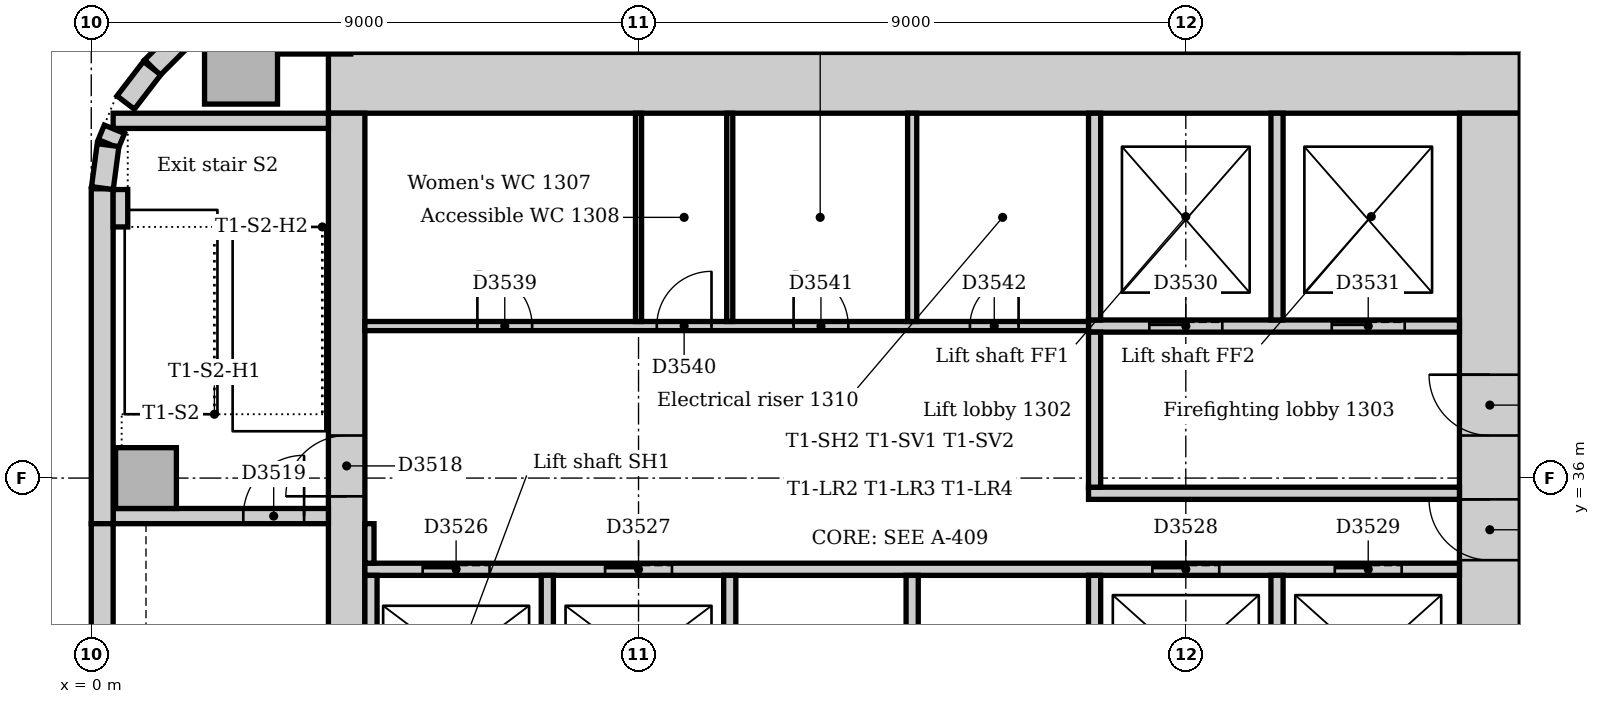
"""IFC4 building model, lengths in metres.
Left out: names, types, materials, properties, quantities, classifications, styles, units other than length and angle.
Written with IfcOpenShell. Run it as: python <this file> out.ifc"""

import sys

from ifc_helpers import new_model, si_unit, direction, frame, frame_2d, origin, origin_2d, place, context, subcontext, project, spatial, rectangle, extrude, element, fill, save


model = new_model("IFC4")
c1 = context("Model", 3, precision=1e-05, world=origin(), true_north=direction((0.0, 1.0)))
c2 = subcontext(c1, "Body", "Model", "MODEL_VIEW")
j1 = project(units=[si_unit("LENGTHUNIT", "METRE"), si_unit("PLANEANGLEUNIT", "RADIAN")], contexts=[c1])
p1 = place(None, origin())
s1 = spatial("IfcSite", under=j1, at=p1, CompositionType="ELEMENT")
p2 = place(p1, origin())
s2 = spatial("IfcBuilding", under=s1, at=p2, CompositionType="ELEMENT")
p3 = place(p2, frame((0.0, 0.0, 59.0)))
s3 = spatial("IfcBuildingStorey", under=s2, at=p3, CompositionType="ELEMENT", Elevation=59.0)
p4 = place(p3, frame((23.5, 42.5, 0.0), z_axis=(0.0, 0.0, 1.0), x_axis=(-1.0, 0.0, 0.0)))
e1 = element("IfcWall", 1, at=p4, inside=s3, PredefinedType="SOLIDWALL", context=c2, shape_type="SweptSolid", body=[
    extrude(rectangle(XDim=19.6, YDim=1.0, at=frame_2d((9.8, 0.0))), origin(), (0.0, 0.0, 1.0), 4.0),
])
p5 = place(p3, frame((23.0, 31.5, 0.0), z_axis=(0.0, 0.0, 1.0), x_axis=(0.0, 1.0, 0.0)))
e2 = element("IfcWall", 2, at=p5, inside=s3, PredefinedType="SOLIDWALL", context=c2, shape_type="SweptSolid", body=[
    extrude(rectangle(XDim=10.5, YDim=1.0, at=frame_2d((5.25, 0.0))), origin(), (0.0, 0.0, 1.0), 4.0),
])
p6 = place(p5, frame((3.15, 0.0, 0.0)))
e3 = element("IfcOpeningElement", 3, at=p6, cuts=e2, PredefinedType="OPENING", context=c2, shape_type="SweptSolid", body=[
    extrude(rectangle(XDim=1.0, YDim=2.1, at=frame_2d((0.5, 1.05))), frame((0.0, 0.51, 0.0), z_axis=(0.0, -1.0, 0.0), x_axis=(1.0, 0.0, 0.0)), (0.0, 0.0, 1.0), 1.02),
])
p7 = place(p5, frame((5.2, 0.0, 0.0)))
e4 = element("IfcOpeningElement", 4, at=p7, cuts=e2, PredefinedType="OPENING", context=c2, shape_type="SweptSolid", body=[
    extrude(rectangle(XDim=1.0, YDim=2.1, at=frame_2d((0.5, 1.05))), frame((0.0, 0.51, 0.0), z_axis=(0.0, -1.0, 0.0), x_axis=(1.0, 0.0, 0.0)), (0.0, 0.0, 1.0), 1.02),
])
p8 = place(p3, frame((4.2, 42.0, 0.0), z_axis=(0.0, 0.0, 1.0), x_axis=(0.0, -1.0, 0.0)))
e5 = element("IfcWall", 5, at=p8, inside=s3, PredefinedType="SOLIDWALL", context=c2, shape_type="SweptSolid", body=[
    extrude(rectangle(XDim=10.5, YDim=0.6, at=frame_2d((5.25, 0.0))), origin(), (0.0, 0.0, 1.0), 4.0),
])
p9 = place(p8, frame((5.3, 0.0, 0.0)))
e6 = element("IfcOpeningElement", 6, at=p9, cuts=e5, PredefinedType="OPENING", context=c2, shape_type="SweptSolid", body=[
    extrude(rectangle(XDim=1.0, YDim=2.1, at=frame_2d((0.5, 1.05))), frame((0.0, 0.31, 0.0), z_axis=(0.0, -1.0, 0.0), x_axis=(1.0, 0.0, 0.0)), (0.0, 0.0, 1.0), 0.62),
])
p10 = place(p3, frame((0.36, 35.375, 0.0), z_axis=(0.0, 0.0, 1.0), x_axis=(1.0, 0.0, 0.0)))
e7 = element("IfcWall", 7, at=p10, inside=s3, PredefinedType="SOLIDWALL", context=c2, shape_type="SweptSolid", body=[
    extrude(rectangle(XDim=3.54, YDim=0.25, at=frame_2d((1.77, 0.0))), origin(), (0.0, 0.0, 1.0), 4.0),
])
p11 = place(p10, frame((2.14, 0.0, 0.0)))
e8 = element("IfcOpeningElement", 8, at=p11, cuts=e7, PredefinedType="OPENING", context=c2, shape_type="SweptSolid", body=[
    extrude(rectangle(XDim=1.0, YDim=2.1, at=frame_2d((0.5, 1.05))), frame((0.0, 0.135, 0.0), z_axis=(0.0, -1.0, 0.0), x_axis=(1.0, 0.0, 0.0)), (0.0, 0.0, 1.0), 0.27),
])
p12 = place(p3, frame((3.9, 41.875, 0.0), z_axis=(0.0, 0.0, 1.0), x_axis=(-1.0, 0.0, 0.0)))
e9 = element("IfcWall", 9, at=p12, inside=s3, PredefinedType="SOLIDWALL", context=c2, shape_type="SweptSolid", body=[
    extrude(rectangle(XDim=3.54, YDim=0.25, at=frame_2d((1.77, 0.0))), origin(), (0.0, 0.0, 1.0), 4.0),
])
for number, where, z_axis, x_axis in (
    (10, (3.667, 43.574, 0.0), (0.0, 0.0, 1.0), (1.0, 0.0, 0.0)),
    (11, (2.463, 42.75, 0.0), (0.0, 0.0, 1.0), (1.0, 0.0, 0.0)),
):
    element("IfcColumn", number, at=place(p3, frame(where, z_axis=z_axis, x_axis=x_axis)), inside=s3, PredefinedType="COLUMN", context=c2, shape_type="SweptSolid", body=[
        extrude(rectangle(XDim=1.2, YDim=1.2, at=origin_2d()), origin(), (0.0, 0.0, 1.0), 3.85),
    ])
p13 = place(p3, frame((0.9, 36.0, 0.0), z_axis=(0.0, 0.0, 1.0), x_axis=(1.0, 0.0, 0.0)))
e12 = element("IfcColumn", 12, at=p13, inside=s3, PredefinedType="COLUMN", context=c2, shape_type="SweptSolid", body=[
    extrude(rectangle(XDim=1.0, YDim=1.0, at=origin_2d()), origin(), (0.0, 0.0, 1.0), 4.0),
])
p14 = place(p3, frame((2.249, 43.994, 0.0), z_axis=(0.0, 0.0, 1.0), x_axis=(-0.707106781187, -0.707106781187, 0.0)))
e13 = element("IfcWall", 13, at=p14, inside=s3, PredefinedType="STANDARD", context=c2, shape_type="SweptSolid", body=[
    extrude(rectangle(XDim=1.757, YDim=0.36, at=frame_2d((0.879, 0.0))), origin(), (0.0, 0.0, 1.0), 3.85),
])
p15 = place(p3, frame((0.18, 40.757, 0.0), z_axis=(0.0, 0.0, 1.0), x_axis=(0.0, -1.0, 0.0)))
e14 = element("IfcWall", 14, at=p15, inside=s3, PredefinedType="STANDARD", context=c2, shape_type="SweptSolid", body=[
    extrude(rectangle(XDim=5.507, YDim=0.36, at=frame_2d((2.754, 0.0))), origin(), (0.0, 0.0, 1.0), 3.85),
])
p16 = place(p3, frame((0.18, 35.25, 0.0), z_axis=(0.0, 0.0, 1.0), x_axis=(0.0, -1.0, 0.0)))
e15 = element("IfcWall", 15, at=p16, inside=s3, PredefinedType="STANDARD", context=c2, shape_type="SweptSolid", body=[
    extrude(rectangle(XDim=7.5, YDim=0.36, at=frame_2d((3.75, 0.0))), origin(), (0.0, 0.0, 1.0), 3.85),
])
p17 = place(p3, frame((1.0, 42.741, 0.0), z_axis=(0.0, 0.0, 1.0), x_axis=(-0.608802368033, -0.793321924995, 0.0)))
e16 = element("IfcWall", 16, at=p17, inside=s3, PredefinedType="STANDARD", context=c2, shape_type="SweptSolid", body=[
    extrude(rectangle(XDim=0.713, YDim=0.36, at=frame_2d((0.357, 0.0))), origin(), (0.0, 0.0, 1.0), 3.85),
])
p18 = place(p3, frame((0.381, 41.736, 0.0), z_axis=(0.0, 0.0, 1.0), x_axis=(-0.382773360986, -0.923842277729, 0.0)))
e17 = element("IfcWall", 17, at=p18, inside=s3, PredefinedType="STANDARD", context=c2, shape_type="SweptSolid", body=[
    extrude(rectangle(XDim=0.258, YDim=0.36, at=frame_2d((0.129, 0.0))), origin(), (0.0, 0.0, 1.0), 3.85),
])
p19 = place(p3, frame((0.276, 41.476, 0.0), z_axis=(0.0, 0.0, 1.0), x_axis=(-0.13055608231, -0.99144092581, 0.0)))
e18 = element("IfcWall", 18, at=p19, inside=s3, PredefinedType="STANDARD", context=c2, shape_type="SweptSolid", body=[
    extrude(rectangle(XDim=0.713, YDim=0.36, at=frame_2d((0.356, 0.0))), origin(), (0.0, 0.0, 1.0), 3.85),
])
p20 = place(p3, frame((0.48, 40.13, 0.0), z_axis=(0.0, 0.0, 1.0), x_axis=(0.0, 1.0, 0.0)))
e19 = element("IfcWall", 19, at=p20, inside=s3, PredefinedType="STANDARD", context=c2, shape_type="SweptSolid", body=[
    extrude(rectangle(XDim=0.615, YDim=0.24, at=frame_2d((0.307, 0.0))), origin(), (0.0, 0.0, 1.0), 4.0),
])
p21 = place(p3, frame((16.4, 35.75, 0.0), z_axis=(0.0, 0.0, 1.0), x_axis=(1.0, 0.0, 0.0)))
e20 = element("IfcWall", 20, at=p21, inside=s3, PredefinedType="PARTITIONING", context=c2, shape_type="SweptSolid", body=[
    extrude(rectangle(XDim=6.1, YDim=0.2, at=frame_2d((3.05, 0.0))), origin(), (0.0, 0.0, 1.0), 3.85),
])
p22 = place(p3, frame((16.4, 38.5, 0.0), z_axis=(0.0, 0.0, 1.0), x_axis=(1.0, 0.0, 0.0)))
e21 = element("IfcWall", 21, at=p22, inside=s3, PredefinedType="PARTITIONING", context=c2, shape_type="SweptSolid", body=[
    extrude(rectangle(XDim=6.1, YDim=0.2, at=frame_2d((3.05, 0.0))), origin(), (0.0, 0.0, 1.0), 3.85),
])
p23 = place(p22, frame((1.0, 0.0, 0.0)))
e22 = element("IfcOpeningElement", 22, at=p23, cuts=e21, PredefinedType="OPENING", context=c2, shape_type="SweptSolid", body=[
    extrude(rectangle(XDim=1.2, YDim=2.1, at=frame_2d((0.6, 1.05))), frame((0.0, 0.11, 0.0), z_axis=(0.0, -1.0, 0.0), x_axis=(1.0, 0.0, 0.0)), (0.0, 0.0, 1.0), 0.22),
])
p24 = place(p22, frame((4.0, 0.0, 0.0)))
e23 = element("IfcOpeningElement", 23, at=p24, cuts=e21, PredefinedType="OPENING", context=c2, shape_type="SweptSolid", body=[
    extrude(rectangle(XDim=1.2, YDim=2.1, at=frame_2d((0.6, 1.05))), frame((0.0, 0.11, 0.0), z_axis=(0.0, -1.0, 0.0), x_axis=(1.0, 0.0, 0.0)), (0.0, 0.0, 1.0), 0.22),
])
p25 = place(p3, frame((16.5, 35.85, 0.0), z_axis=(0.0, 0.0, 1.0), x_axis=(0.0, 1.0, 0.0)))
e24 = element("IfcWall", 24, at=p25, inside=s3, PredefinedType="PARTITIONING", context=c2, shape_type="SweptSolid", body=[
    extrude(rectangle(XDim=2.55, YDim=0.2, at=frame_2d((1.275, 0.0))), origin(), (0.0, 0.0, 1.0), 3.85),
])
p26 = place(p3, frame((4.5, 34.5, 0.0), z_axis=(0.0, 0.0, 1.0), x_axis=(1.0, 0.0, 0.0)))
e25 = element("IfcWall", 25, at=p26, inside=s3, PredefinedType="PARTITIONING", context=c2, shape_type="SweptSolid", body=[
    extrude(rectangle(XDim=18.0, YDim=0.2, at=frame_2d((9.0, 0.0))), origin(), (0.0, 0.0, 1.0), 3.85),
])
p27 = place(p26, frame((0.95, 0.0, 0.0)))
e26 = element("IfcOpeningElement", 26, at=p27, cuts=e25, PredefinedType="OPENING", context=c2, shape_type="SweptSolid", body=[
    extrude(rectangle(XDim=1.1, YDim=2.1, at=frame_2d((0.55, 1.05))), frame((0.0, 0.11, 0.0), z_axis=(0.0, -1.0, 0.0), x_axis=(1.0, 0.0, 0.0)), (0.0, 0.0, 1.0), 0.22),
])
p28 = place(p26, frame((3.95, 0.0, 0.0)))
e27 = element("IfcOpeningElement", 27, at=p28, cuts=e25, PredefinedType="OPENING", context=c2, shape_type="SweptSolid", body=[
    extrude(rectangle(XDim=1.1, YDim=2.1, at=frame_2d((0.55, 1.05))), frame((0.0, 0.11, 0.0), z_axis=(0.0, -1.0, 0.0), x_axis=(1.0, 0.0, 0.0)), (0.0, 0.0, 1.0), 0.22),
])
p29 = place(p26, frame((12.95, 0.0, 0.0)))
e28 = element("IfcOpeningElement", 28, at=p29, cuts=e25, PredefinedType="OPENING", context=c2, shape_type="SweptSolid", body=[
    extrude(rectangle(XDim=1.1, YDim=2.1, at=frame_2d((0.55, 1.05))), frame((0.0, 0.11, 0.0), z_axis=(0.0, -1.0, 0.0), x_axis=(1.0, 0.0, 0.0)), (0.0, 0.0, 1.0), 0.22),
])
p30 = place(p26, frame((15.95, 0.0, 0.0)))
e29 = element("IfcOpeningElement", 29, at=p30, cuts=e25, PredefinedType="OPENING", context=c2, shape_type="SweptSolid", body=[
    extrude(rectangle(XDim=1.1, YDim=2.1, at=frame_2d((0.55, 1.05))), frame((0.0, 0.11, 0.0), z_axis=(0.0, -1.0, 0.0), x_axis=(1.0, 0.0, 0.0)), (0.0, 0.0, 1.0), 0.22),
])
for number, where, z_axis, x_axis in (
    (30, (16.5, 38.6, 0.0), (0.0, 0.0, 1.0), (0.0, 1.0, 0.0)),
    (31, (19.5, 38.6, 0.0), (0.0, 0.0, 1.0), (0.0, 1.0, 0.0)),
):
    element("IfcWall", number, at=place(p3, frame(where, z_axis=z_axis, x_axis=x_axis)), inside=s3, PredefinedType="PARTITIONING", context=c2, shape_type="SweptSolid", body=[
        extrude(rectangle(XDim=3.4, YDim=0.2, at=frame_2d((1.7, 0.0))), origin(), (0.0, 0.0, 1.0), 3.85),
    ])
for number, where, z_axis, x_axis in (
    (32, (4.6, 31.75, 0.0), (0.0, 0.0, 1.0), (0.0, 1.0, 0.0)),
    (33, (7.5, 31.75, 0.0), (0.0, 0.0, 1.0), (0.0, 1.0, 0.0)),
    (34, (10.5, 31.75, 0.0), (0.0, 0.0, 1.0), (0.0, 1.0, 0.0)),
    (35, (13.5, 31.75, 0.0), (0.0, 0.0, 1.0), (0.0, 1.0, 0.0)),
    (36, (16.5, 31.75, 0.0), (0.0, 0.0, 1.0), (0.0, 1.0, 0.0)),
    (37, (19.5, 31.75, 0.0), (0.0, 0.0, 1.0), (0.0, 1.0, 0.0)),
):
    element("IfcWall", number, at=place(p3, frame(where, z_axis=z_axis, x_axis=x_axis)), inside=s3, PredefinedType="PARTITIONING", context=c2, shape_type="SweptSolid", body=[
        extrude(rectangle(XDim=2.65, YDim=0.2, at=frame_2d((1.325, 0.0))), origin(), (0.0, 0.0, 1.0), 3.85),
    ])
p31 = place(p3, frame((4.5, 38.5, 0.0), z_axis=(0.0, 0.0, 1.0), x_axis=(1.0, 0.0, 0.0)))
e38 = element("IfcWall", 38, at=p31, inside=s3, PredefinedType="PARTITIONING", context=c2, shape_type="SweptSolid", body=[
    extrude(rectangle(XDim=11.9, YDim=0.15, at=frame_2d((5.95, 0.0))), origin(), (0.0, 0.0, 1.0), 3.85),
])
p32 = place(p31, frame((1.85, 0.0, 0.0)))
e39 = element("IfcOpeningElement", 39, at=p32, cuts=e38, PredefinedType="OPENING", context=c2, shape_type="SweptSolid", body=[
    extrude(rectangle(XDim=0.9, YDim=2.1, at=frame_2d((0.45, 1.05))), frame((0.0, 0.085, 0.0), z_axis=(0.0, -1.0, 0.0), x_axis=(1.0, 0.0, 0.0)), (0.0, 0.0, 1.0), 0.17),
])
p33 = place(p31, frame((4.8, 0.0, 0.0)))
e40 = element("IfcOpeningElement", 40, at=p33, cuts=e38, PredefinedType="OPENING", context=c2, shape_type="SweptSolid", body=[
    extrude(rectangle(XDim=0.9, YDim=2.1, at=frame_2d((0.45, 1.05))), frame((0.0, 0.085, 0.0), z_axis=(0.0, -1.0, 0.0), x_axis=(1.0, 0.0, 0.0)), (0.0, 0.0, 1.0), 0.17),
])
p34 = place(p31, frame((7.05, 0.0, 0.0)))
e41 = element("IfcOpeningElement", 41, at=p34, cuts=e38, PredefinedType="OPENING", context=c2, shape_type="SweptSolid", body=[
    extrude(rectangle(XDim=0.9, YDim=2.1, at=frame_2d((0.45, 1.05))), frame((0.0, 0.085, 0.0), z_axis=(0.0, -1.0, 0.0), x_axis=(1.0, 0.0, 0.0)), (0.0, 0.0, 1.0), 0.17),
])
p35 = place(p31, frame((9.95, 0.0, 0.0)))
e42 = element("IfcOpeningElement", 42, at=p35, cuts=e38, PredefinedType="OPENING", context=c2, shape_type="SweptSolid", body=[
    extrude(rectangle(XDim=0.8, YDim=2.1, at=frame_2d((0.4, 1.05))), frame((0.0, 0.085, 0.0), z_axis=(0.0, -1.0, 0.0), x_axis=(1.0, 0.0, 0.0)), (0.0, 0.0, 1.0), 0.17),
])
p36 = place(p3, frame((4.575, 34.6, 0.0), z_axis=(0.0, 0.0, 1.0), x_axis=(0.0, 1.0, 0.0)))
e43 = element("IfcWall", 43, at=p36, inside=s3, PredefinedType="PARTITIONING", context=c2, shape_type="SweptSolid", body=[
    extrude(rectangle(XDim=0.65, YDim=0.15, at=frame_2d((0.325, 0.0))), origin(), (0.0, 0.0, 1.0), 3.85),
])
p37 = place(p3, frame((13.5, 38.575, 0.0), z_axis=(0.0, 0.0, 1.0), x_axis=(0.0, 1.0, 0.0)))
e44 = element("IfcWall", 44, at=p37, inside=s3, PredefinedType="PARTITIONING", context=c2, shape_type="SweptSolid", body=[
    extrude(rectangle(XDim=3.425, YDim=0.15, at=frame_2d((1.712, 0.0))), origin(), (0.0, 0.0, 1.0), 3.85),
])
for number, where, z_axis, x_axis in (
    (45, (9.0, 38.575, 0.0), (0.0, 0.0, 1.0), (0.0, 1.0, 0.0)),
    (46, (10.5, 38.575, 0.0), (0.0, 0.0, 1.0), (0.0, 1.0, 0.0)),
):
    element("IfcWall", number, at=place(p3, frame(where, z_axis=z_axis, x_axis=x_axis)), inside=s3, PredefinedType="PARTITIONING", context=c2, shape_type="SweptSolid", body=[
        extrude(rectangle(XDim=3.425, YDim=0.1, at=frame_2d((1.712, 0.0))), origin(), (0.0, 0.0, 1.0), 3.85),
    ])
p38 = place(p9, frame((1.0, 0.0, 0.0), z_axis=(0.0, 0.0, 1.0), x_axis=(-1.0, 0.0, 0.0)))
e47 = element("IfcDoor", 47, at=p38, inside=s3, OperationType="SINGLE_SWING_LEFT", PredefinedType="DOOR", context=c2, shape_type="SweptSolid", body=[
    extrude(rectangle(XDim=1.0, YDim=2.1, at=frame_2d((0.5, 1.05))), frame((0.0, 0.025, 0.0), z_axis=(0.0, -1.0, 0.0), x_axis=(1.0, 0.0, 0.0)), (0.0, 0.0, 1.0), 0.05),
])
fill(e6, e47)
p39 = place(p11, origin())
e48 = element("IfcDoor", 48, at=p39, inside=s3, OperationType="SINGLE_SWING_RIGHT", PredefinedType="DOOR", context=c2, shape_type="SweptSolid", body=[
    extrude(rectangle(XDim=1.0, YDim=2.1, at=frame_2d((0.5, 1.05))), frame((0.0, 0.025, 0.0), z_axis=(0.0, -1.0, 0.0), x_axis=(1.0, 0.0, 0.0)), (0.0, 0.0, 1.0), 0.05),
])
fill(e8, e48)
p40 = place(p27, origin())
e49 = element("IfcDoor", 49, at=p40, inside=s3, OperationType="SLIDING_TO_LEFT", PredefinedType="DOOR", context=c2, shape_type="SweptSolid", body=[
    extrude(rectangle(XDim=1.1, YDim=2.1, at=frame_2d((0.55, 1.05))), frame((0.0, 0.025, 0.0), z_axis=(0.0, -1.0, 0.0), x_axis=(1.0, 0.0, 0.0)), (0.0, 0.0, 1.0), 0.05),
])
fill(e26, e49)
p41 = place(p28, origin())
e50 = element("IfcDoor", 50, at=p41, inside=s3, OperationType="SLIDING_TO_LEFT", PredefinedType="DOOR", context=c2, shape_type="SweptSolid", body=[
    extrude(rectangle(XDim=1.1, YDim=2.1, at=frame_2d((0.55, 1.05))), frame((0.0, 0.025, 0.0), z_axis=(0.0, -1.0, 0.0), x_axis=(1.0, 0.0, 0.0)), (0.0, 0.0, 1.0), 0.05),
])
fill(e27, e50)
p42 = place(p29, origin())
e51 = element("IfcDoor", 51, at=p42, inside=s3, OperationType="SLIDING_TO_LEFT", PredefinedType="DOOR", context=c2, shape_type="SweptSolid", body=[
    extrude(rectangle(XDim=1.1, YDim=2.1, at=frame_2d((0.55, 1.05))), frame((0.0, 0.025, 0.0), z_axis=(0.0, -1.0, 0.0), x_axis=(1.0, 0.0, 0.0)), (0.0, 0.0, 1.0), 0.05),
])
fill(e28, e51)
p43 = place(p30, origin())
e52 = element("IfcDoor", 52, at=p43, inside=s3, OperationType="SLIDING_TO_LEFT", PredefinedType="DOOR", context=c2, shape_type="SweptSolid", body=[
    extrude(rectangle(XDim=1.1, YDim=2.1, at=frame_2d((0.55, 1.05))), frame((0.0, 0.025, 0.0), z_axis=(0.0, -1.0, 0.0), x_axis=(1.0, 0.0, 0.0)), (0.0, 0.0, 1.0), 0.05),
])
fill(e29, e52)
p44 = place(p23, origin())
e53 = element("IfcDoor", 53, at=p44, inside=s3, OperationType="SLIDING_TO_LEFT", PredefinedType="DOOR", context=c2, shape_type="SweptSolid", body=[
    extrude(rectangle(XDim=1.2, YDim=2.1, at=frame_2d((0.6, 1.05))), frame((0.0, 0.025, 0.0), z_axis=(0.0, -1.0, 0.0), x_axis=(1.0, 0.0, 0.0)), (0.0, 0.0, 1.0), 0.05),
])
fill(e22, e53)
p45 = place(p24, origin())
e54 = element("IfcDoor", 54, at=p45, inside=s3, OperationType="SLIDING_TO_LEFT", PredefinedType="DOOR", context=c2, shape_type="SweptSolid", body=[
    extrude(rectangle(XDim=1.2, YDim=2.1, at=frame_2d((0.6, 1.05))), frame((0.0, 0.025, 0.0), z_axis=(0.0, -1.0, 0.0), x_axis=(1.0, 0.0, 0.0)), (0.0, 0.0, 1.0), 0.05),
])
fill(e23, e54)
p46 = place(p6, origin())
e55 = element("IfcDoor", 55, at=p46, inside=s3, OperationType="SINGLE_SWING_RIGHT", PredefinedType="DOOR", context=c2, shape_type="SweptSolid", body=[
    extrude(rectangle(XDim=1.0, YDim=2.1, at=frame_2d((0.5, 1.05))), frame((0.0, 0.025, 0.0), z_axis=(0.0, -1.0, 0.0), x_axis=(1.0, 0.0, 0.0)), (0.0, 0.0, 1.0), 0.05),
])
fill(e3, e55)
p47 = place(p7, origin())
e56 = element("IfcDoor", 56, at=p47, inside=s3, OperationType="SINGLE_SWING_RIGHT", PredefinedType="DOOR", context=c2, shape_type="SweptSolid", body=[
    extrude(rectangle(XDim=1.0, YDim=2.1, at=frame_2d((0.5, 1.05))), frame((0.0, 0.025, 0.0), z_axis=(0.0, -1.0, 0.0), x_axis=(1.0, 0.0, 0.0)), (0.0, 0.0, 1.0), 0.05),
])
fill(e4, e56)
p48 = place(p32, origin())
e57 = element("IfcDoor", 57, at=p48, inside=s3, OperationType="SINGLE_SWING_LEFT", PredefinedType="DOOR", context=c2, shape_type="SweptSolid", body=[
    extrude(rectangle(XDim=0.9, YDim=2.1, at=frame_2d((0.45, 1.05))), frame((0.0, 0.025, 0.0), z_axis=(0.0, -1.0, 0.0), x_axis=(1.0, 0.0, 0.0)), (0.0, 0.0, 1.0), 0.05),
])
fill(e39, e57)
p49 = place(p33, origin())
e58 = element("IfcDoor", 58, at=p49, inside=s3, OperationType="SINGLE_SWING_RIGHT", PredefinedType="DOOR", context=c2, shape_type="SweptSolid", body=[
    extrude(rectangle(XDim=0.9, YDim=2.1, at=frame_2d((0.45, 1.05))), frame((0.0, 0.025, 0.0), z_axis=(0.0, -1.0, 0.0), x_axis=(1.0, 0.0, 0.0)), (0.0, 0.0, 1.0), 0.05),
])
fill(e40, e58)
p50 = place(p34, origin())
e59 = element("IfcDoor", 59, at=p50, inside=s3, OperationType="SINGLE_SWING_LEFT", PredefinedType="DOOR", context=c2, shape_type="SweptSolid", body=[
    extrude(rectangle(XDim=0.9, YDim=2.1, at=frame_2d((0.45, 1.05))), frame((0.0, 0.025, 0.0), z_axis=(0.0, -1.0, 0.0), x_axis=(1.0, 0.0, 0.0)), (0.0, 0.0, 1.0), 0.05),
])
fill(e41, e59)
p51 = place(p35, origin())
e60 = element("IfcDoor", 60, at=p51, inside=s3, OperationType="SINGLE_SWING_RIGHT", PredefinedType="DOOR", context=c2, shape_type="SweptSolid", body=[
    extrude(rectangle(XDim=0.8, YDim=2.1, at=frame_2d((0.4, 1.05))), frame((0.0, 0.025, 0.0), z_axis=(0.0, -1.0, 0.0), x_axis=(1.0, 0.0, 0.0)), (0.0, 0.0, 1.0), 0.05),
])
fill(e42, e60)
save(model, sys.argv[1])
